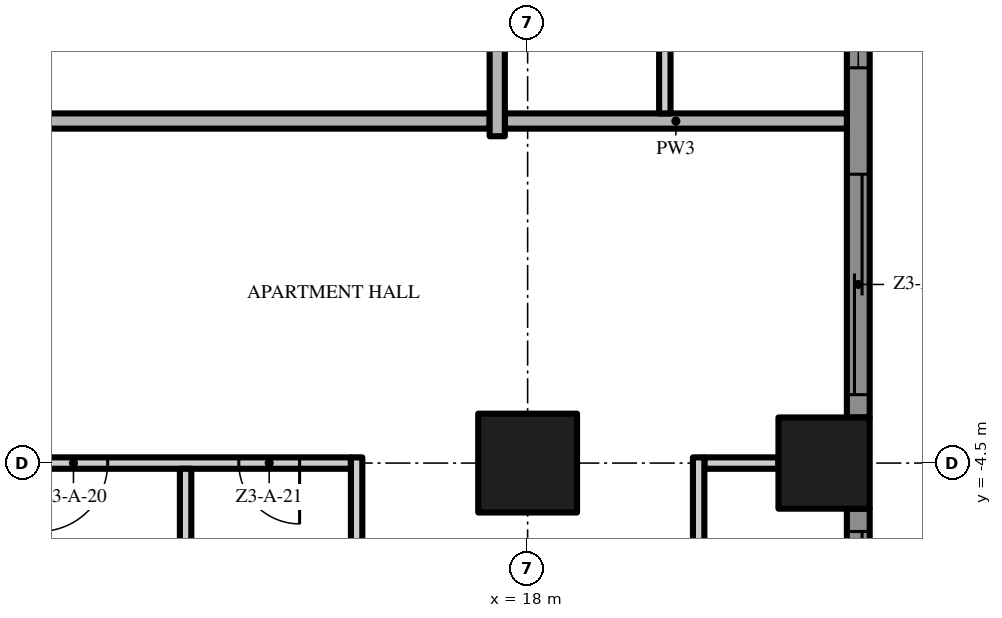
"""IFC4 building model, lengths in metres.
Left out: names, types, materials, properties, quantities, classifications, styles, units other than length and angle.
Written with IfcOpenShell. Run it as: python <this file> out.ifc"""

import sys

from ifc_helpers import new_model, si_unit, direction, frame, frame_2d, origin, origin_2d, place, context, subcontext, project, spatial, polyline, rectangle, outline, extrude, element, fill, save


model = new_model("IFC4")
c1 = context("Model", 3, precision=1e-05, world=origin(), true_north=direction((0.0, 1.0)))
c2 = subcontext(c1, "Body", "Model", "MODEL_VIEW")
j1 = project(units=[si_unit("LENGTHUNIT", "METRE"), si_unit("PLANEANGLEUNIT", "RADIAN")], contexts=[c1])
p1 = place(None, origin())
s1 = spatial("IfcSite", under=j1, at=p1, CompositionType="ELEMENT")
p2 = place(p1, origin())
s2 = spatial("IfcBuilding", under=s1, at=p2, CompositionType="ELEMENT")
p3 = place(p2, frame((0.0, 0.0, 132.6)))
s3 = spatial("IfcBuildingStorey", under=s2, at=p3, CompositionType="ELEMENT", Elevation=132.6)
p4 = place(p3, frame((18.0, -4.5, 0.0), z_axis=(0.0, 0.0, 1.0), x_axis=(1.0, 0.0, 0.0)))
e1 = element("IfcColumn", 1, at=p4, inside=s3, PredefinedType="COLUMN", context=c2, shape_type="SweptSolid", body=[
    extrude(rectangle(XDim=1.3, YDim=1.3, at=origin_2d()), origin(), (0.0, 0.0, 1.0), 3.5),
])
p5 = place(p3, frame((21.9, -4.5, 0.0), z_axis=(0.0, 0.0, 1.0), x_axis=(1.0, 0.0, 0.0)))
e2 = element("IfcColumn", 2, at=p5, inside=s3, PredefinedType="COLUMN", context=c2, shape_type="SweptSolid", body=[
    extrude(rectangle(XDim=1.2, YDim=1.2, at=origin_2d()), origin(), (0.0, 0.0, 1.0), 3.5),
])
p6 = place(p3, frame((22.35, -5.1, 0.0), z_axis=(0.0, 0.0, 1.0), x_axis=(0.0, -1.0, 0.0)))
e3 = element("IfcWall", 3, at=p6, inside=s3, PredefinedType="SOLIDWALL", context=c2, shape_type="SweptSolid", body=[
    extrude(rectangle(XDim=7.2, YDim=0.3, at=frame_2d((3.6, 0.0))), origin(), (0.0, 0.0, 1.0), 3.5),
])
p7 = place(p6, frame((4.6, 0.0, 0.45)))
e4 = element("IfcOpeningElement", 4, at=p7, cuts=e3, PredefinedType="OPENING", context=c2, shape_type="SweptSolid", body=[
    extrude(rectangle(XDim=2.3, YDim=2.65, at=frame_2d((1.15, 1.325))), frame((0.0, 0.16, 0.0), z_axis=(0.0, -1.0, 0.0), x_axis=(1.0, 0.0, 0.0)), (0.0, 0.0, 1.0), 0.32),
])
p8 = place(p6, frame((0.3, 0.0, 0.0)))
e5 = element("IfcOpeningElement", 5, at=p8, cuts=e3, PredefinedType="OPENING", context=c2, shape_type="SweptSolid", body=[
    extrude(rectangle(XDim=2.9, YDim=2.4, at=frame_2d((1.45, 1.2))), frame((0.0, 0.16, 0.0), z_axis=(0.0, -1.0, 0.0), x_axis=(1.0, 0.0, 0.0)), (0.0, 0.0, 1.0), 0.32),
])
p9 = place(p3, frame((22.35, 3.9, 0.0), z_axis=(0.0, 0.0, 1.0), x_axis=(0.0, -1.0, 0.0)))
e6 = element("IfcWall", 6, at=p9, inside=s3, PredefinedType="SOLIDWALL", context=c2, shape_type="SweptSolid", body=[
    extrude(rectangle(XDim=7.8, YDim=0.3, at=frame_2d((3.9, 0.0))), origin(), (0.0, 0.0, 1.0), 3.5),
])
p10 = place(p9, frame((4.6, 0.0, 0.0)))
e7 = element("IfcOpeningElement", 7, at=p10, cuts=e6, PredefinedType="OPENING", context=c2, shape_type="SweptSolid", body=[
    extrude(rectangle(XDim=2.9, YDim=2.4, at=frame_2d((1.45, 1.2))), frame((0.0, 0.16, 0.0), z_axis=(0.0, -1.0, 0.0), x_axis=(1.0, 0.0, 0.0)), (0.0, 0.0, 1.0), 0.32),
])
p11 = place(p9, frame((0.3, 0.0, 0.45)))
e8 = element("IfcOpeningElement", 8, at=p11, cuts=e6, PredefinedType="OPENING", context=c2, shape_type="SweptSolid", body=[
    extrude(rectangle(XDim=2.9, YDim=2.65, at=frame_2d((1.45, 1.325))), frame((0.0, 0.16, 0.0), z_axis=(0.0, -1.0, 0.0), x_axis=(1.0, 0.0, 0.0)), (0.0, 0.0, 1.0), 0.32),
])
p12 = place(p3, origin())
e9 = element("IfcWall", 9, at=p12, inside=s3, PredefinedType="USERDEFINED", context=c2, shape_type="SweptSolid", body=[
    extrude(outline(polyline([(23.451, -13.5), (23.115, -12.0), (23.1, -11.625), (23.231, -10.5), (23.755, -9.0), (24.488, -7.5), (25.149, -6.0), (25.485, -4.5), (25.5, -4.125), (25.369, -3.0), (24.845, -1.5), (24.112, 0.0), (23.451, 1.5), (23.115, 3.0), (23.1, 3.375), (23.231, 4.5), (23.755, 6.0), (24.488, 7.5), (25.149, 9.0), (25.485, 10.5), (25.5, 10.875), (25.369, 12.0), (24.845, 13.5), (24.112, 15.0), (23.451, 16.5), (23.115, 18.0), (22.871, 17.945), (23.213, 16.421), (23.885, 14.895), (24.614, 13.404), (25.124, 11.944), (25.249, 10.865), (25.236, 10.533), (24.91, 9.079), (24.261, 7.605), (23.524, 6.096), (22.986, 4.556), (22.849, 3.385), (22.866, 2.967), (23.213, 1.421), (23.885, -0.105), (24.614, -1.596), (25.124, -3.056), (25.249, -4.135), (25.236, -4.467), (24.91, -5.921), (24.261, -7.395), (23.524, -8.904), (22.986, -10.444), (22.849, -11.615), (22.866, -12.033), (23.208, -13.555), (23.451, -13.5)])), origin(), (0.0, 0.0, 1.0), 0.9),
])
p13 = place(p3, frame((15.675, -4.5, 0.0), z_axis=(0.0, 0.0, 1.0), x_axis=(-1.0, 0.0, 0.0)))
e10 = element("IfcWall", 10, at=p13, inside=s3, PredefinedType="PARTITIONING", context=c2, shape_type="SweptSolid", body=[
    extrude(rectangle(XDim=4.35, YDim=0.15, at=frame_2d((2.175, 0.0))), origin(), (0.0, 0.0, 1.0), 3.5),
])
p14 = place(p13, frame((3.2, 0.0, 0.0)))
e11 = element("IfcOpeningElement", 11, at=p14, cuts=e10, PredefinedType="OPENING", context=c2, shape_type="SweptSolid", body=[
    extrude(rectangle(XDim=0.9, YDim=2.1, at=frame_2d((0.45, 1.05))), frame((0.0, 0.085, 0.0), z_axis=(0.0, -1.0, 0.0), x_axis=(1.0, 0.0, 0.0)), (0.0, 0.0, 1.0), 0.17),
])
p15 = place(p13, frame((0.675, 0.0, 0.0)))
e12 = element("IfcOpeningElement", 12, at=p15, cuts=e10, PredefinedType="OPENING", context=c2, shape_type="SweptSolid", body=[
    extrude(rectangle(XDim=0.8, YDim=2.0, at=frame_2d((0.4, 1.0))), frame((0.0, 0.085, 0.0), z_axis=(0.0, -1.0, 0.0), x_axis=(1.0, 0.0, 0.0)), (0.0, 0.0, 1.0), 0.17),
])
p16 = place(p3, frame((20.325, -4.5, 0.0), z_axis=(0.0, 0.0, 1.0), x_axis=(1.0, 0.0, 0.0)))
e13 = element("IfcWall", 13, at=p16, inside=s3, PredefinedType="PARTITIONING", context=c2, shape_type="SweptSolid", body=[
    extrude(rectangle(XDim=0.975, YDim=0.15, at=frame_2d((0.487, 0.0))), origin(), (0.0, 0.0, 1.0), 3.5),
])
p17 = place(p3, frame((17.5, 0.0, 0.0), z_axis=(0.0, 0.0, 1.0), x_axis=(-1.0, 0.0, 0.0)))
e14 = element("IfcWall", 14, at=p17, inside=s3, PredefinedType="PARTITIONING", context=c2, shape_type="SweptSolid", body=[
    extrude(rectangle(XDim=35.0, YDim=0.2, at=frame_2d((17.5, 0.0))), origin(), (0.0, 0.0, 1.0), 3.5),
])
p18 = place(p17, frame((16.75, 0.0, 0.0)))
e15 = element("IfcOpeningElement", 15, at=p18, cuts=e14, PredefinedType="OPENING", context=c2, shape_type="SweptSolid", body=[
    extrude(rectangle(XDim=1.5, YDim=2.4, at=frame_2d((0.75, 1.2))), frame((0.0, 0.11, 0.0), z_axis=(0.0, -1.0, 0.0), x_axis=(1.0, 0.0, 0.0)), (0.0, 0.0, 1.0), 0.22),
])
p19 = place(p3, frame((17.7, 0.0, 0.0), z_axis=(0.0, 0.0, 1.0), x_axis=(1.0, 0.0, 0.0)))
e16 = element("IfcWall", 16, at=p19, inside=s3, PredefinedType="PARTITIONING", context=c2, shape_type="SweptSolid", body=[
    extrude(rectangle(XDim=4.5, YDim=0.2, at=frame_2d((2.25, 0.0))), origin(), (0.0, 0.0, 1.0), 3.5),
])
p20 = place(p3, frame((13.5, -17.7, 0.0), z_axis=(0.0, 0.0, 1.0), x_axis=(0.0, 1.0, 0.0)))
e17 = element("IfcWall", 17, at=p20, inside=s3, PredefinedType="PARTITIONING", context=c2, shape_type="SweptSolid", body=[
    extrude(rectangle(XDim=13.125, YDim=0.15, at=frame_2d((6.562, 0.0))), origin(), (0.0, 0.0, 1.0), 3.5),
])
p21 = place(p3, frame((15.75, -12.075, 0.0), z_axis=(0.0, 0.0, 1.0), x_axis=(0.0, 1.0, 0.0)))
e18 = element("IfcWall", 18, at=p21, inside=s3, PredefinedType="PARTITIONING", context=c2, shape_type="SweptSolid", body=[
    extrude(rectangle(XDim=7.65, YDim=0.15, at=frame_2d((3.825, 0.0))), origin(), (0.0, 0.0, 1.0), 3.5),
])
p22 = place(p3, frame((17.6, -0.2, 0.0), z_axis=(0.0, 0.0, 1.0), x_axis=(0.0, 1.0, 0.0)))
e19 = element("IfcWall", 19, at=p22, inside=s3, PredefinedType="PARTITIONING", context=c2, shape_type="SweptSolid", body=[
    extrude(rectangle(XDim=4.05, YDim=0.2, at=frame_2d((2.025, 0.0))), origin(), (0.0, 0.0, 1.0), 3.5),
])
p23 = place(p3, frame((19.805, 0.1, 0.0), z_axis=(0.0, 0.0, 1.0), x_axis=(0.0, 1.0, 0.0)))
e20 = element("IfcWall", 20, at=p23, inside=s3, PredefinedType="PARTITIONING", context=c2, shape_type="SweptSolid", body=[
    extrude(rectangle(XDim=2.225, YDim=0.15, at=frame_2d((1.113, 0.0))), origin(), (0.0, 0.0, 1.0), 3.5),
])
p24 = place(p3, frame((20.25, -4.425, 0.0), z_axis=(0.0, 0.0, 1.0), x_axis=(0.0, -1.0, 0.0)))
e21 = element("IfcWall", 21, at=p24, inside=s3, PredefinedType="PARTITIONING", context=c2, shape_type="SweptSolid", body=[
    extrude(rectangle(XDim=4.5, YDim=0.15, at=frame_2d((2.25, 0.0))), origin(), (0.0, 0.0, 1.0), 3.5),
])
p25 = place(p24, frame((1.95, 0.0, 0.0)))
e22 = element("IfcOpeningElement", 22, at=p25, cuts=e21, PredefinedType="OPENING", context=c2, shape_type="SweptSolid", body=[
    extrude(rectangle(XDim=0.8, YDim=2.0, at=frame_2d((0.4, 1.0))), frame((0.0, 0.085, 0.0), z_axis=(0.0, -1.0, 0.0), x_axis=(1.0, 0.0, 0.0)), (0.0, 0.0, 1.0), 0.17),
])
p26 = place(p8, origin())
e23 = element("IfcDoor", 23, at=p26, inside=s3, OperationType="SINGLE_SWING_LEFT", PredefinedType="DOOR", context=c2, shape_type="SweptSolid", body=[
    extrude(rectangle(XDim=2.9, YDim=2.4, at=frame_2d((1.45, 1.2))), frame((0.0, 0.025, 0.0), z_axis=(0.0, -1.0, 0.0), x_axis=(1.0, 0.0, 0.0)), (0.0, 0.0, 1.0), 0.05),
])
fill(e5, e23)
p27 = place(p10, origin())
e24 = element("IfcDoor", 24, at=p27, inside=s3, OperationType="SINGLE_SWING_LEFT", PredefinedType="DOOR", context=c2, shape_type="SweptSolid", body=[
    extrude(rectangle(XDim=2.9, YDim=2.4, at=frame_2d((1.45, 1.2))), frame((0.0, 0.025, 0.0), z_axis=(0.0, -1.0, 0.0), x_axis=(1.0, 0.0, 0.0)), (0.0, 0.0, 1.0), 0.05),
])
fill(e7, e24)
p28 = place(p11, origin())
e25 = element("IfcWindow", 25, at=p28, inside=s3, PartitioningType="SINGLE_PANEL", PredefinedType="WINDOW", context=c2, shape_type="SweptSolid", body=[
    extrude(rectangle(XDim=2.9, YDim=2.65, at=frame_2d((1.45, 1.325))), frame((0.0, 0.03, 0.0), z_axis=(0.0, -1.0, 0.0), x_axis=(1.0, 0.0, 0.0)), (0.0, 0.0, 1.0), 0.06),
])
fill(e8, e25)
p29 = place(p14, origin())
e26 = element("IfcDoor", 26, at=p29, inside=s3, OperationType="SINGLE_SWING_RIGHT", PredefinedType="DOOR", context=c2, shape_type="SweptSolid", body=[
    extrude(rectangle(XDim=0.9, YDim=2.1, at=frame_2d((0.45, 1.05))), frame((0.0, 0.025, 0.0), z_axis=(0.0, -1.0, 0.0), x_axis=(1.0, 0.0, 0.0)), (0.0, 0.0, 1.0), 0.05),
])
fill(e11, e26)
p30 = place(p15, origin())
e27 = element("IfcDoor", 27, at=p30, inside=s3, OperationType="SINGLE_SWING_LEFT", PredefinedType="DOOR", context=c2, shape_type="SweptSolid", body=[
    extrude(rectangle(XDim=0.8, YDim=2.0, at=frame_2d((0.4, 1.0))), frame((0.0, 0.025, 0.0), z_axis=(0.0, -1.0, 0.0), x_axis=(1.0, 0.0, 0.0)), (0.0, 0.0, 1.0), 0.05),
])
fill(e12, e27)
save(model, sys.argv[1])
